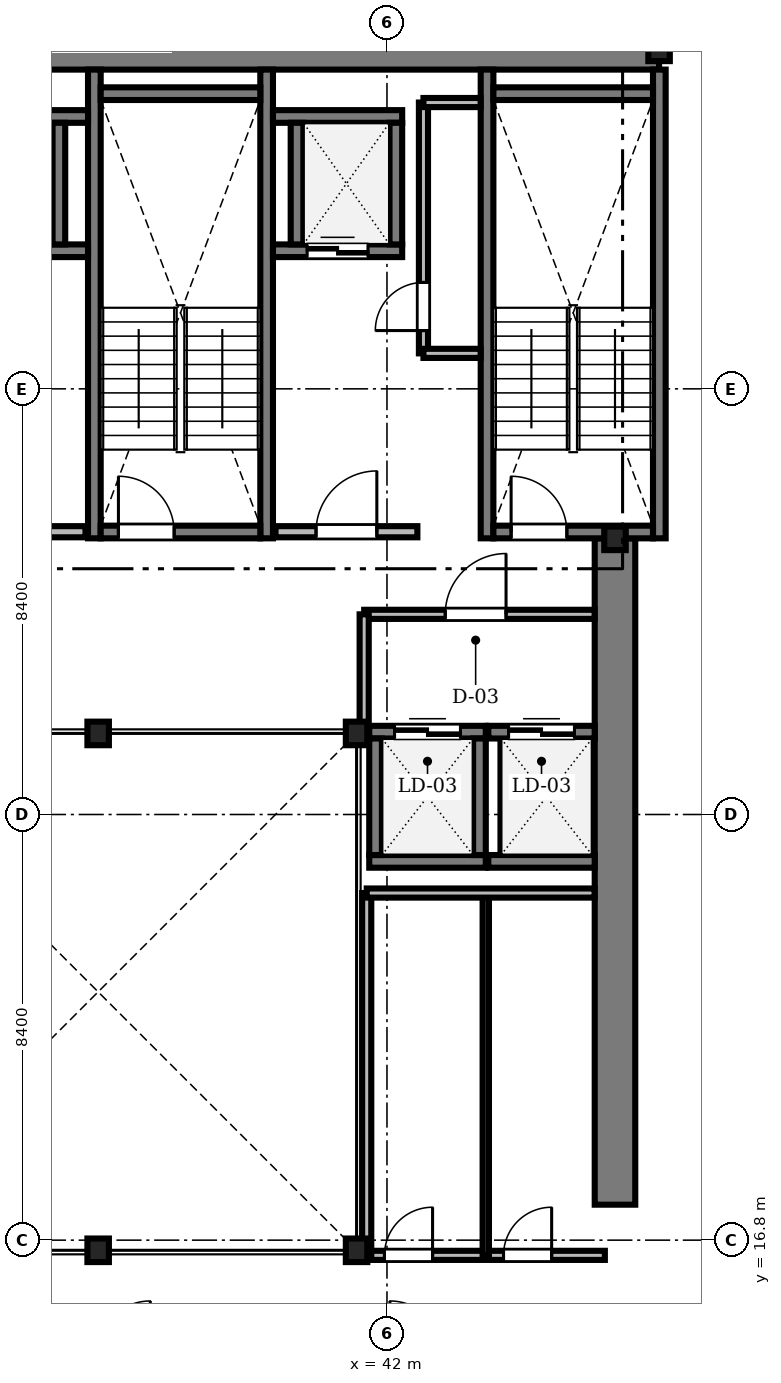
"""IFC4 building model, lengths in metres.
Left out: names, types, materials, properties, quantities, classifications, styles, units other than length and angle.
Written with IfcOpenShell. Run it as: python <this file> out.ifc"""

import sys

from ifc_helpers import new_model, si_unit, direction, frame, frame_2d, origin, origin_2d, place, context, subcontext, project, spatial, rectangle, i_section, extrude, source, transform, mapped, element, fill, save


model = new_model("IFC4")
c1 = context("Model", 3, precision=1e-05, world=origin(), true_north=direction((0.0, 1.0)))
c2 = subcontext(c1, "Body", "Model", "MODEL_VIEW")
j1 = project(units=[si_unit("LENGTHUNIT", "METRE"), si_unit("PLANEANGLEUNIT", "RADIAN")], contexts=[c1])
p1 = place(None, origin())
s1 = spatial("IfcSite", under=j1, at=p1, CompositionType="ELEMENT")
p2 = place(p1, origin())
s2 = spatial("IfcBuilding", under=s1, at=p2, CompositionType="ELEMENT")
p3 = place(p2, frame((0.0, 0.0, 144.6)))
s3 = spatial("IfcBuildingStorey", under=s2, at=p3, CompositionType="ELEMENT", Elevation=144.6)
m1 = source(origin(), c2, "Body", "SweptSolid", [
    extrude(rectangle(XDim=17.52, YDim=0.8, at=frame_2d((8.76, 0.0))), origin(), (0.0, 0.0, 1.0), 3.46),
])
p4 = place(p3, frame((29.85, 40.3, 0.0), z_axis=(0.0, 0.0, 1.0), x_axis=(1.0, 0.0, 0.0)))
e1 = element("IfcWall", 1, at=p4, inside=s3, PredefinedType="SHEAR", context=c2, shape_type="MappedRepresentation", body=[
    mapped(m1, transform((0.0, 0.0, 0.0), scale=1.0)),
])
m2 = source(origin(), c2, "Body", "SweptSolid", [
    extrude(rectangle(XDim=13.15, YDim=0.8, at=frame_2d((6.575, 0.0))), origin(), (0.0, 0.0, 1.0), 3.46),
])
p5 = place(p3, frame((46.5, 17.5, 0.0), z_axis=(0.0, 0.0, 1.0), x_axis=(0.0, 1.0, 0.0)))
e2 = element("IfcWall", 2, at=p5, inside=s3, PredefinedType="SHEAR", context=c2, shape_type="MappedRepresentation", body=[
    mapped(m2, transform((0.0, 0.0, 0.0), scale=1.0)),
])
m3 = source(origin(), c2, "Body", "SweptSolid", [
    extrude(i_section(OverallWidth=0.424, OverallDepth=0.465, WebThickness=0.035, FlangeThickness=0.056, FilletRadius=0.015, at=origin_2d()), origin(), (0.0, 0.0, 1.0), 3.46),
])
for number, where, z_axis, x_axis in (
    (3, (36.3, 16.6, 0.0), (0.0, 0.0, 1.0), (1.0, 0.0, 0.0)),
    (4, (41.4, 16.6, 0.0), (0.0, 0.0, 1.0), (1.0, 0.0, 0.0)),
    (5, (41.4, 26.8, 0.0), (0.0, 0.0, 1.0), (1.0, 0.0, 0.0)),
    (6, (36.3, 26.8, 0.0), (0.0, 0.0, 1.0), (1.0, 0.0, 0.0)),
    (7, (46.5, 30.65, 0.0), (0.0, 0.0, 1.0), (1.0, 0.0, 0.0)),
    (8, (47.37, 40.3, 0.0), (0.0, 0.0, 1.0), (1.0, 0.0, 0.0)),
):
    element("IfcColumn", number, at=place(p3, frame(where, z_axis=z_axis, x_axis=x_axis)), inside=s3, PredefinedType="COLUMN", context=c2, shape_type="MappedRepresentation", body=[
        mapped(m3, transform((0.0, 0.0, 0.0), scale=1.0)),
    ])
m4 = source(origin(), c2, "Body", "SweptSolid", [
    extrude(rectangle(XDim=9.25, YDim=0.25, at=frame_2d((4.625, 0.0))), origin(), (0.0, 0.0, 1.0), 3.5),
])
for number, where, z_axis, x_axis in (
    (9, (36.225, 30.65, 0.0), (0.0, 0.0, 1.0), (0.0, 1.0, 0.0)),
    (10, (39.625, 30.65, 0.0), (0.0, 0.0, 1.0), (0.0, 1.0, 0.0)),
):
    element("IfcWall", number, at=place(p3, frame(where, z_axis=z_axis, x_axis=x_axis)), inside=s3, PredefinedType="SOLIDWALL", context=c2, shape_type="MappedRepresentation", body=[
        mapped(m4, transform((0.0, 0.0, 0.0), scale=1.0)),
    ])
m5 = source(origin(), c2, "Body", "SweptSolid", [
    extrude(rectangle(XDim=3.15, YDim=0.25, at=frame_2d((1.575, 0.0))), origin(), (0.0, 0.0, 1.0), 3.5),
])
p6 = place(p3, frame((36.35, 39.425, 0.0), z_axis=(0.0, 0.0, 1.0), x_axis=(1.0, 0.0, 0.0)))
e11 = element("IfcWall", 11, at=p6, inside=s3, PredefinedType="SOLIDWALL", context=c2, shape_type="MappedRepresentation", body=[
    mapped(m5, transform((0.0, 0.0, 0.0), scale=1.0)),
])
p7 = place(p3, frame((36.35, 30.775, 0.0), z_axis=(0.0, 0.0, 1.0), x_axis=(1.0, 0.0, 0.0)))
e12 = element("IfcWall", 12, at=p7, inside=s3, PredefinedType="SOLIDWALL", context=c2, shape_type="MappedRepresentation", body=[
    mapped(m5, transform((0.0, 0.0, 0.0), scale=1.0)),
])
m6 = source(origin(), c2, "Body", "SweptSolid", [
    extrude(rectangle(XDim=1.1, YDim=2.2, at=frame_2d((0.55, 1.1))), frame((0.0, 0.135, 0.0), z_axis=(0.0, -1.0, 0.0), x_axis=(1.0, 0.0, 0.0)), (0.0, 0.0, 1.0), 0.27),
])
p8 = place(p7, frame((0.35, 0.0, 0.0)))
e13 = element("IfcOpeningElement", 13, at=p8, cuts=e12, PredefinedType="OPENING", context=c2, shape_type="MappedRepresentation", body=[
    mapped(m6, transform((0.0, 0.0, 0.0), scale=1.0)),
])
for number, where, z_axis, x_axis in (
    (14, (43.975, 30.65, 0.0), (0.0, 0.0, 1.0), (0.0, 1.0, 0.0)),
    (15, (47.375, 30.65, 0.0), (0.0, 0.0, 1.0), (0.0, 1.0, 0.0)),
):
    element("IfcWall", number, at=place(p3, frame(where, z_axis=z_axis, x_axis=x_axis)), inside=s3, PredefinedType="SOLIDWALL", context=c2, shape_type="MappedRepresentation", body=[
        mapped(m4, transform((0.0, 0.0, 0.0), scale=1.0)),
    ])
p9 = place(p3, frame((44.1, 39.425, 0.0), z_axis=(0.0, 0.0, 1.0), x_axis=(1.0, 0.0, 0.0)))
e16 = element("IfcWall", 16, at=p9, inside=s3, PredefinedType="SOLIDWALL", context=c2, shape_type="MappedRepresentation", body=[
    mapped(m5, transform((0.0, 0.0, 0.0), scale=1.0)),
])
p10 = place(p3, frame((44.1, 30.775, 0.0), z_axis=(0.0, 0.0, 1.0), x_axis=(1.0, 0.0, 0.0)))
e17 = element("IfcWall", 17, at=p10, inside=s3, PredefinedType="SOLIDWALL", context=c2, shape_type="MappedRepresentation", body=[
    mapped(m5, transform((0.0, 0.0, 0.0), scale=1.0)),
])
p11 = place(p10, frame((0.35, 0.0, 0.0)))
e18 = element("IfcOpeningElement", 18, at=p11, cuts=e17, PredefinedType="OPENING", context=c2, shape_type="MappedRepresentation", body=[
    mapped(m6, transform((0.0, 0.0, 0.0), scale=1.0)),
])
m7 = source(origin(), c2, "Body", "SweptSolid", [
    extrude(rectangle(XDim=3.0, YDim=0.22, at=frame_2d((1.5, 0.0))), origin(), (0.0, 0.0, 1.0), 3.46),
])
p12 = place(p3, frame((33.05, 30.78, 0.0), z_axis=(0.0, 0.0, 1.0), x_axis=(1.0, 0.0, 0.0)))
e19 = element("IfcWall", 19, at=p12, inside=s3, PredefinedType="SOLIDWALL", context=c2, shape_type="MappedRepresentation", body=[
    mapped(m7, transform((0.0, 0.0, 0.0), scale=1.0)),
])
m8 = source(origin(), c2, "Body", "SweptSolid", [
    extrude(rectangle(XDim=1.2, YDim=2.2, at=frame_2d((0.6, 1.1))), frame((0.0, 0.12, 0.0), z_axis=(0.0, -1.0, 0.0), x_axis=(1.0, 0.0, 0.0)), (0.0, 0.0, 1.0), 0.24),
])
p13 = place(p12, frame((0.9, 0.0, 0.0)))
e20 = element("IfcOpeningElement", 20, at=p13, cuts=e19, PredefinedType="OPENING", context=c2, shape_type="MappedRepresentation", body=[
    mapped(m8, transform((0.0, 0.0, 0.0), scale=1.0)),
])
m9 = source(origin(), c2, "Body", "SweptSolid", [
    extrude(rectangle(XDim=2.8, YDim=0.22, at=frame_2d((1.4, 0.0))), origin(), (0.0, 0.0, 1.0), 3.46),
])
p14 = place(p3, frame((39.8, 30.78, 0.0), z_axis=(0.0, 0.0, 1.0), x_axis=(1.0, 0.0, 0.0)))
e21 = element("IfcWall", 21, at=p14, inside=s3, PredefinedType="SOLIDWALL", context=c2, shape_type="MappedRepresentation", body=[
    mapped(m9, transform((0.0, 0.0, 0.0), scale=1.0)),
])
p15 = place(p14, frame((0.8, 0.0, 0.0)))
e22 = element("IfcOpeningElement", 22, at=p15, cuts=e21, PredefinedType="OPENING", context=c2, shape_type="MappedRepresentation", body=[
    mapped(m8, transform((0.0, 0.0, 0.0), scale=1.0)),
])
m10 = source(origin(), c2, "Body", "SweptSolid", [
    extrude(rectangle(XDim=3.1, YDim=0.25, at=frame_2d((1.55, 0.0))), origin(), (0.0, 0.0, 1.0), 3.46),
])
p16 = place(p3, frame((33.0, 36.325, 0.0), z_axis=(0.0, 0.0, 1.0), x_axis=(1.0, 0.0, 0.0)))
e23 = element("IfcWall", 23, at=p16, inside=s3, PredefinedType="SOLIDWALL", context=c2, shape_type="MappedRepresentation", body=[
    mapped(m10, transform((0.0, 0.0, 0.0), scale=1.0)),
])
m11 = source(origin(), c2, "Body", "SweptSolid", [
    extrude(rectangle(XDim=1.2, YDim=2.25, at=frame_2d((0.6, 1.125))), frame((0.0, 0.135, 0.0), z_axis=(0.0, -1.0, 0.0), x_axis=(1.0, 0.0, 0.0)), (0.0, 0.0, 1.0), 0.27),
])
p17 = place(p16, frame((0.95, 0.0, 0.0)))
e24 = element("IfcOpeningElement", 24, at=p17, cuts=e23, PredefinedType="OPENING", context=c2, shape_type="MappedRepresentation", body=[
    mapped(m11, transform((0.0, 0.0, 0.0), scale=1.0)),
])
p18 = place(p3, frame((33.0, 38.975, 0.0), z_axis=(0.0, 0.0, 1.0), x_axis=(1.0, 0.0, 0.0)))
e25 = element("IfcWall", 25, at=p18, inside=s3, PredefinedType="SOLIDWALL", context=c2, shape_type="MappedRepresentation", body=[
    mapped(m10, transform((0.0, 0.0, 0.0), scale=1.0)),
])
m12 = source(origin(), c2, "Body", "SweptSolid", [
    extrude(rectangle(XDim=2.4, YDim=0.25, at=frame_2d((1.2, 0.0))), origin(), (0.0, 0.0, 1.0), 3.46),
])
p19 = place(p3, frame((35.525, 36.45, 0.0), z_axis=(0.0, 0.0, 1.0), x_axis=(0.0, 1.0, 0.0)))
e26 = element("IfcWall", 26, at=p19, inside=s3, PredefinedType="SOLIDWALL", context=c2, shape_type="MappedRepresentation", body=[
    mapped(m12, transform((0.0, 0.0, 0.0), scale=1.0)),
])
m13 = source(origin(), c2, "Body", "SweptSolid", [
    extrude(rectangle(XDim=2.55, YDim=0.25, at=frame_2d((1.275, 0.0))), origin(), (0.0, 0.0, 1.0), 3.46),
])
p20 = place(p3, frame((39.75, 36.325, 0.0), z_axis=(0.0, 0.0, 1.0), x_axis=(1.0, 0.0, 0.0)))
e27 = element("IfcWall", 27, at=p20, inside=s3, PredefinedType="SOLIDWALL", context=c2, shape_type="MappedRepresentation", body=[
    mapped(m13, transform((0.0, 0.0, 0.0), scale=1.0)),
])
p21 = place(p20, frame((0.675, 0.0, 0.0)))
e28 = element("IfcOpeningElement", 28, at=p21, cuts=e27, PredefinedType="OPENING", context=c2, shape_type="MappedRepresentation", body=[
    mapped(m11, transform((0.0, 0.0, 0.0), scale=1.0)),
])
p22 = place(p3, frame((39.75, 38.975, 0.0), z_axis=(0.0, 0.0, 1.0), x_axis=(1.0, 0.0, 0.0)))
e29 = element("IfcWall", 29, at=p22, inside=s3, PredefinedType="SOLIDWALL", context=c2, shape_type="MappedRepresentation", body=[
    mapped(m13, transform((0.0, 0.0, 0.0), scale=1.0)),
])
for number, where, z_axis, x_axis in (
    (30, (40.225, 36.45, 0.0), (0.0, 0.0, 1.0), (0.0, 1.0, 0.0)),
    (31, (42.175, 36.45, 0.0), (0.0, 0.0, 1.0), (0.0, 1.0, 0.0)),
):
    element("IfcWall", number, at=place(p3, frame(where, z_axis=z_axis, x_axis=x_axis)), inside=s3, PredefinedType="SOLIDWALL", context=c2, shape_type="MappedRepresentation", body=[
        mapped(m12, transform((0.0, 0.0, 0.0), scale=1.0)),
    ])
m14 = source(origin(), c2, "Body", "SweptSolid", [
    extrude(rectangle(XDim=2.3, YDim=0.25, at=frame_2d((1.15, 0.0))), origin(), (0.0, 0.0, 1.0), 3.46),
])
p23 = place(p3, frame((41.65, 24.275, 0.0), z_axis=(0.0, 0.0, 1.0), x_axis=(1.0, 0.0, 0.0)))
e32 = element("IfcWall", 32, at=p23, inside=s3, PredefinedType="SOLIDWALL", context=c2, shape_type="MappedRepresentation", body=[
    mapped(m14, transform((0.0, 0.0, 0.0), scale=1.0)),
])
p24 = place(p3, frame((41.65, 26.825, 0.0), z_axis=(0.0, 0.0, 1.0), x_axis=(1.0, 0.0, 0.0)))
e33 = element("IfcWall", 33, at=p24, inside=s3, PredefinedType="SOLIDWALL", context=c2, shape_type="MappedRepresentation", body=[
    mapped(m14, transform((0.0, 0.0, 0.0), scale=1.0)),
])
m15 = source(origin(), c2, "Body", "SweptSolid", [
    extrude(rectangle(XDim=1.3, YDim=2.3, at=frame_2d((0.65, 1.15))), frame((0.0, 0.135, 0.0), z_axis=(0.0, -1.0, 0.0), x_axis=(1.0, 0.0, 0.0)), (0.0, 0.0, 1.0), 0.27),
])
p25 = place(p24, frame((0.5, 0.0, 0.0)))
e34 = element("IfcOpeningElement", 34, at=p25, cuts=e33, PredefinedType="OPENING", context=c2, shape_type="MappedRepresentation", body=[
    mapped(m15, transform((0.0, 0.0, 0.0), scale=1.0)),
])
for number, where, z_axis, x_axis in (
    (35, (41.775, 24.4, 0.0), (0.0, 0.0, 1.0), (0.0, 1.0, 0.0)),
    (36, (43.825, 24.4, 0.0), (0.0, 0.0, 1.0), (0.0, 1.0, 0.0)),
):
    element("IfcWall", number, at=place(p3, frame(where, z_axis=z_axis, x_axis=x_axis)), inside=s3, PredefinedType="SOLIDWALL", context=c2, shape_type="MappedRepresentation", body=[
        mapped(m14, transform((0.0, 0.0, 0.0), scale=1.0)),
    ])
m16 = source(origin(), c2, "Body", "SweptSolid", [
    extrude(rectangle(XDim=2.1, YDim=0.25, at=frame_2d((1.05, 0.0))), origin(), (0.0, 0.0, 1.0), 3.46),
])
p26 = place(p3, frame((44.0, 24.275, 0.0), z_axis=(0.0, 0.0, 1.0), x_axis=(1.0, 0.0, 0.0)))
e37 = element("IfcWall", 37, at=p26, inside=s3, PredefinedType="SOLIDWALL", context=c2, shape_type="MappedRepresentation", body=[
    mapped(m16, transform((0.0, 0.0, 0.0), scale=1.0)),
])
p27 = place(p3, frame((44.0, 26.825, 0.0), z_axis=(0.0, 0.0, 1.0), x_axis=(1.0, 0.0, 0.0)))
e38 = element("IfcWall", 38, at=p27, inside=s3, PredefinedType="SOLIDWALL", context=c2, shape_type="MappedRepresentation", body=[
    mapped(m16, transform((0.0, 0.0, 0.0), scale=1.0)),
])
p28 = place(p27, frame((0.4, 0.0, 0.0)))
e39 = element("IfcOpeningElement", 39, at=p28, cuts=e38, PredefinedType="OPENING", context=c2, shape_type="MappedRepresentation", body=[
    mapped(m15, transform((0.0, 0.0, 0.0), scale=1.0)),
])
m17 = source(origin(), c2, "Body", "SweptSolid", [
    extrude(rectangle(XDim=4.95, YDim=0.18, at=frame_2d((2.475, 0.0))), origin(), (0.0, 0.0, 1.0), 3.46),
])
p29 = place(p3, frame((42.72, 34.3, 0.0), z_axis=(0.0, 0.0, 1.0), x_axis=(0.0, 1.0, 0.0)))
e40 = element("IfcWall", 40, at=p29, inside=s3, PredefinedType="PARTITIONING", context=c2, shape_type="MappedRepresentation", body=[
    mapped(m17, transform((0.0, 0.0, 0.0), scale=1.0)),
])
m18 = source(origin(), c2, "Body", "SweptSolid", [
    extrude(rectangle(XDim=0.95, YDim=2.15, at=frame_2d((0.475, 1.075))), frame((0.0, 0.1, 0.0), z_axis=(0.0, -1.0, 0.0), x_axis=(1.0, 0.0, 0.0)), (0.0, 0.0, 1.0), 0.2),
])
p30 = place(p29, frame((0.45, 0.0, 0.0)))
e41 = element("IfcOpeningElement", 41, at=p30, cuts=e40, PredefinedType="OPENING", context=c2, shape_type="MappedRepresentation", body=[
    mapped(m18, transform((0.0, 0.0, 0.0), scale=1.0)),
])
m19 = source(origin(), c2, "Body", "SweptSolid", [
    extrude(rectangle(XDim=4.548, YDim=0.18, at=frame_2d((2.274, 0.0))), origin(), (0.0, 0.0, 1.0), 3.092),
])
p31 = place(p3, frame((41.55, 29.15, 0.0), z_axis=(0.0, 0.0, 1.0), x_axis=(1.0, 0.0, 0.0)))
e42 = element("IfcWall", 42, at=p31, inside=s3, PredefinedType="PARTITIONING", context=c2, shape_type="MappedRepresentation", body=[
    mapped(m19, transform((0.0, 0.0, 0.0), scale=1.0)),
])
m20 = source(origin(), c2, "Body", "SweptSolid", [
    extrude(rectangle(XDim=1.2, YDim=2.2, at=frame_2d((0.6, 1.1))), frame((0.0, 0.1, 0.0), z_axis=(0.0, -1.0, 0.0), x_axis=(1.0, 0.0, 0.0)), (0.0, 0.0, 1.0), 0.2),
])
p32 = place(p31, frame((1.6, 0.0, 0.0)))
e43 = element("IfcOpeningElement", 43, at=p32, cuts=e42, PredefinedType="OPENING", context=c2, shape_type="MappedRepresentation", body=[
    mapped(m20, transform((0.0, 0.0, 0.0), scale=1.0)),
])
m21 = source(origin(), c2, "Body", "SweptSolid", [
    extrude(rectangle(XDim=4.7, YDim=0.18, at=frame_2d((2.35, 0.0))), origin(), (0.0, 0.0, 1.0), 2.852),
])
p33 = place(p3, frame((41.6, 16.5, 0.0), z_axis=(0.0, 0.0, 1.0), x_axis=(1.0, 0.0, 0.0)))
e44 = element("IfcWall", 44, at=p33, inside=s3, PredefinedType="PARTITIONING", context=c2, shape_type="MappedRepresentation", body=[
    mapped(m21, transform((0.0, 0.0, 0.0), scale=1.0)),
])
p34 = place(p33, frame((0.35, 0.0, 0.0)))
e45 = element("IfcOpeningElement", 45, at=p34, cuts=e44, PredefinedType="OPENING", context=c2, shape_type="MappedRepresentation", body=[
    mapped(m18, transform((0.0, 0.0, 0.0), scale=1.0)),
])
p35 = place(p33, frame((2.7, 0.0, 0.0)))
e46 = element("IfcOpeningElement", 46, at=p35, cuts=e44, PredefinedType="OPENING", context=c2, shape_type="MappedRepresentation", body=[
    mapped(m18, transform((0.0, 0.0, 0.0), scale=1.0)),
])
m22 = source(origin(), c2, "Body", "SweptSolid", [
    extrude(rectangle(XDim=7.15, YDim=0.18, at=frame_2d((3.575, 0.0))), origin(), (0.0, 0.0, 1.0), 2.852),
])
p36 = place(p3, frame((41.6, 16.5, 0.0), z_axis=(0.0, 0.0, 1.0), x_axis=(0.0, 1.0, 0.0)))
e47 = element("IfcWall", 47, at=p36, inside=s3, PredefinedType="PARTITIONING", context=c2, shape_type="MappedRepresentation", body=[
    mapped(m22, transform((0.0, 0.0, 0.0), scale=1.0)),
])
m23 = source(origin(), c2, "Body", "SweptSolid", [
    extrude(rectangle(XDim=7.15, YDim=0.125, at=frame_2d((3.575, 0.0))), origin(), (0.0, 0.0, 1.0), 2.852),
])
p37 = place(p3, frame((43.95, 16.5, 0.0), z_axis=(0.0, 0.0, 1.0), x_axis=(0.0, 1.0, 0.0)))
e48 = element("IfcWall", 48, at=p37, inside=s3, PredefinedType="PARTITIONING", context=c2, shape_type="MappedRepresentation", body=[
    mapped(m23, transform((0.0, 0.0, 0.0), scale=1.0)),
])
m24 = source(origin(), c2, "Body", "SweptSolid", [
    extrude(rectangle(XDim=4.498, YDim=0.18, at=frame_2d((2.249, 0.0))), origin(), (0.0, 0.0, 1.0), 3.46),
])
p38 = place(p3, frame((41.6, 23.65, 0.0), z_axis=(0.0, 0.0, 1.0), x_axis=(1.0, 0.0, 0.0)))
e49 = element("IfcWall", 49, at=p38, inside=s3, PredefinedType="PARTITIONING", context=c2, shape_type="MappedRepresentation", body=[
    mapped(m24, transform((0.0, 0.0, 0.0), scale=1.0)),
])
m25 = source(origin(), c2, "Body", "SweptSolid", [
    extrude(rectangle(XDim=2.35, YDim=0.18, at=frame_2d((1.175, 0.0))), origin(), (0.0, 0.0, 1.0), 2.852),
])
p39 = place(p3, frame((41.55, 26.8, 0.0), z_axis=(0.0, 0.0, 1.0), x_axis=(0.0, 1.0, 0.0)))
e50 = element("IfcWall", 50, at=p39, inside=s3, PredefinedType="PARTITIONING", context=c2, shape_type="MappedRepresentation", body=[
    mapped(m25, transform((0.0, 0.0, 0.0), scale=1.0)),
])
m26 = source(origin(), c2, "Body", "SweptSolid", [
    extrude(rectangle(XDim=1.128, YDim=0.18, at=frame_2d((0.564, 0.0))), origin(), (0.0, 0.0, 1.0), 3.46),
])
for number, where, z_axis, x_axis in (
    (51, (42.72, 34.3, 0.0), (0.0, 0.0, 1.0), (1.0, 0.0, 0.0)),
    (52, (42.72, 39.25, 0.0), (0.0, 0.0, 1.0), (1.0, 0.0, 0.0)),
):
    element("IfcWall", number, at=place(p3, frame(where, z_axis=z_axis, x_axis=x_axis)), inside=s3, PredefinedType="PARTITIONING", context=c2, shape_type="MappedRepresentation", body=[
        mapped(m26, transform((0.0, 0.0, 0.0), scale=1.0)),
    ])
m27 = source(origin(), c2, "Body", "SweptSolid", [
    extrude(rectangle(XDim=1.1, YDim=2.2, at=frame_2d((0.55, 1.1))), frame((0.0, 0.025, 0.0), z_axis=(0.0, -1.0, 0.0), x_axis=(1.0, 0.0, 0.0)), (0.0, 0.0, 1.0), 0.05),
])
p40 = place(p8, origin())
e53 = element("IfcDoor", 53, at=p40, inside=s3, OperationType="SINGLE_SWING_LEFT", PredefinedType="DOOR", context=c2, shape_type="MappedRepresentation", body=[
    mapped(m27, transform((0.0, 0.0, 0.0), scale=1.0)),
])
fill(e13, e53)
p41 = place(p11, origin())
e54 = element("IfcDoor", 54, at=p41, inside=s3, OperationType="SINGLE_SWING_LEFT", PredefinedType="DOOR", context=c2, shape_type="MappedRepresentation", body=[
    mapped(m27, transform((0.0, 0.0, 0.0), scale=1.0)),
])
fill(e18, e54)
m28 = source(origin(), c2, "Body", "SweptSolid", [
    extrude(rectangle(XDim=1.2, YDim=2.2, at=frame_2d((0.6, 1.1))), frame((0.0, 0.025, 0.0), z_axis=(0.0, -1.0, 0.0), x_axis=(1.0, 0.0, 0.0)), (0.0, 0.0, 1.0), 0.05),
])
p42 = place(p15, origin())
e55 = element("IfcDoor", 55, at=p42, inside=s3, OperationType="SINGLE_SWING_RIGHT", PredefinedType="DOOR", context=c2, shape_type="MappedRepresentation", body=[
    mapped(m28, transform((0.0, 0.0, 0.0), scale=1.0)),
])
fill(e22, e55)
m29 = source(origin(), c2, "Body", "SweptSolid", [
    extrude(rectangle(XDim=1.2, YDim=2.25, at=frame_2d((0.6, 1.125))), frame((0.0, 0.025, 0.0), z_axis=(0.0, -1.0, 0.0), x_axis=(1.0, 0.0, 0.0)), (0.0, 0.0, 1.0), 0.05),
])
p43 = place(p21, origin())
e56 = element("IfcDoor", 56, at=p43, inside=s3, OperationType="DOUBLE_DOOR_SLIDING", PredefinedType="DOOR", context=c2, shape_type="MappedRepresentation", body=[
    mapped(m29, transform((0.0, 0.0, 0.0), scale=1.0)),
])
fill(e28, e56)
m30 = source(origin(), c2, "Body", "SweptSolid", [
    extrude(rectangle(XDim=1.3, YDim=2.3, at=frame_2d((0.65, 1.15))), frame((0.0, 0.025, 0.0), z_axis=(0.0, -1.0, 0.0), x_axis=(1.0, 0.0, 0.0)), (0.0, 0.0, 1.0), 0.05),
])
p44 = place(p25, origin())
e57 = element("IfcDoor", 57, at=p44, inside=s3, OperationType="DOUBLE_DOOR_SLIDING", PredefinedType="DOOR", context=c2, shape_type="MappedRepresentation", body=[
    mapped(m30, transform((0.0, 0.0, 0.0), scale=1.0)),
])
fill(e34, e57)
p45 = place(p28, origin())
e58 = element("IfcDoor", 58, at=p45, inside=s3, OperationType="DOUBLE_DOOR_SLIDING", PredefinedType="DOOR", context=c2, shape_type="MappedRepresentation", body=[
    mapped(m30, transform((0.0, 0.0, 0.0), scale=1.0)),
])
fill(e39, e58)
m31 = source(origin(), c2, "Body", "SweptSolid", [
    extrude(rectangle(XDim=0.95, YDim=2.15, at=frame_2d((0.475, 1.075))), frame((0.0, 0.025, 0.0), z_axis=(0.0, -1.0, 0.0), x_axis=(1.0, 0.0, 0.0)), (0.0, 0.0, 1.0), 0.05),
])
p46 = place(p30, origin())
e59 = element("IfcDoor", 59, at=p46, inside=s3, OperationType="SINGLE_SWING_LEFT", PredefinedType="DOOR", context=c2, shape_type="MappedRepresentation", body=[
    mapped(m31, transform((0.0, 0.0, 0.0), scale=1.0)),
])
fill(e41, e59)
p47 = place(p32, origin())
e60 = element("IfcDoor", 60, at=p47, inside=s3, OperationType="SINGLE_SWING_RIGHT", PredefinedType="DOOR", context=c2, shape_type="MappedRepresentation", body=[
    mapped(m28, transform((0.0, 0.0, 0.0), scale=1.0)),
])
fill(e43, e60)
p48 = place(p34, origin())
e61 = element("IfcDoor", 61, at=p48, inside=s3, OperationType="SINGLE_SWING_RIGHT", PredefinedType="DOOR", context=c2, shape_type="MappedRepresentation", body=[
    mapped(m31, transform((0.0, 0.0, 0.0), scale=1.0)),
])
fill(e45, e61)
p49 = place(p35, origin())
e62 = element("IfcDoor", 62, at=p49, inside=s3, OperationType="SINGLE_SWING_RIGHT", PredefinedType="DOOR", context=c2, shape_type="MappedRepresentation", body=[
    mapped(m31, transform((0.0, 0.0, 0.0), scale=1.0)),
])
fill(e46, e62)
save(model, sys.argv[1])
